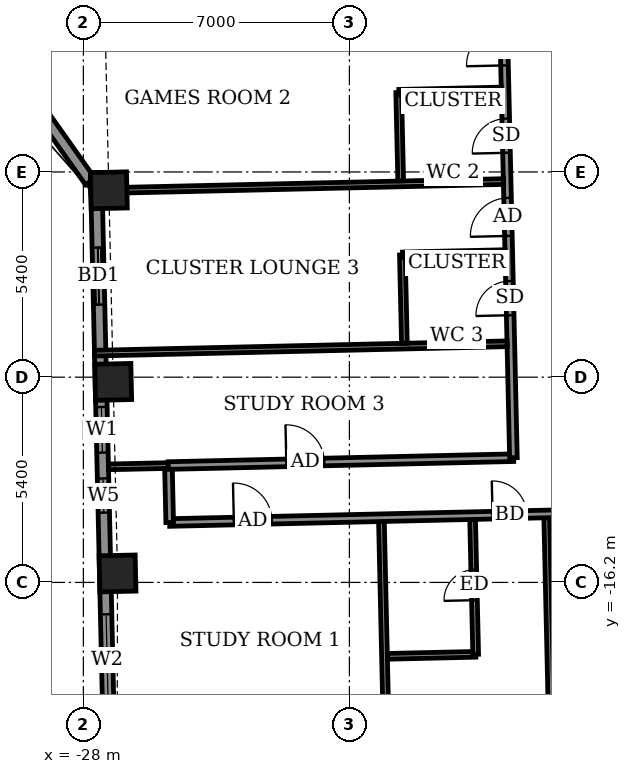
"""IFC4 building model, lengths in metres.
Left out: names, types, materials, properties, quantities, classifications, styles, units other than length and angle.
Written with IfcOpenShell. Run it as: python <this file> out.ifc"""

import sys

from ifc_helpers import new_model, si_unit, direction, frame, frame_2d, origin, origin_2d, place, context, subcontext, project, spatial, rectangle, extrude, element, fill, save


model = new_model("IFC4")
c1 = context("Model", 3, precision=1e-05, world=origin(), true_north=direction((0.0, 1.0)))
c2 = subcontext(c1, "Body", "Model", "MODEL_VIEW")
j1 = project(units=[si_unit("LENGTHUNIT", "METRE"), si_unit("PLANEANGLEUNIT", "RADIAN")], contexts=[c1])
p1 = place(None, origin())
s1 = spatial("IfcSite", under=j1, at=p1, CompositionType="ELEMENT")
p2 = place(p1, origin())
s2 = spatial("IfcBuilding", under=s1, at=p2, CompositionType="ELEMENT")
p3 = place(p2, frame((0.0, 0.0, 297.9)))
s3 = spatial("IfcBuildingStorey", under=s2, at=p3, CompositionType="ELEMENT", Elevation=297.9)
for number, where, z_axis, x_axis in (
    (1, (-27.329, -5.883, -0.55), (0.0, 0.0, 1.0), (0.023, -1.0, 0.0)),
    (2, (-27.215, -10.924, -0.55), (0.0, 0.0, 1.0), (0.023, -1.0, 0.0)),
    (3, (-27.101, -15.964, -0.55), (0.0, 0.0, 1.0), (0.023, -1.0, 0.0)),
):
    element("IfcColumn", number, at=place(p3, frame(where, z_axis=z_axis, x_axis=x_axis)), inside=s3, PredefinedType="COLUMN", context=c2, shape_type="SweptSolid", body=[
        extrude(rectangle(XDim=0.95, YDim=0.95, at=origin_2d()), origin(), (0.0, 0.0, 1.0), 3.6),
    ])
p4 = place(p3, frame((-29.883, -2.738, 0.0), z_axis=(0.0, 0.0, 1.0), x_axis=(0.578095163598, -0.815969351033, 0.0)))
e4 = element("IfcWall", 4, at=p4, inside=s3, PredefinedType="SOLIDWALL", context=c2, shape_type="SweptSolid", body=[
    extrude(rectangle(XDim=3.569, YDim=0.3, at=frame_2d((1.784, 0.0))), origin(), (0.0, 0.0, 1.0), 3.05),
])
p5 = place(p4, frame((0.338, 0.0, 0.9)))
e5 = element("IfcOpeningElement", 5, at=p5, cuts=e4, PredefinedType="OPENING", context=c2, shape_type="SweptSolid", body=[
    extrude(rectangle(XDim=1.2, YDim=1.5, at=frame_2d((0.6, 0.75))), frame((0.0, 0.16, 0.0), z_axis=(0.0, -1.0, 0.0), x_axis=(1.0, 0.0, 0.0)), (0.0, 0.0, 1.0), 0.32),
])
p6 = place(p3, frame((-27.665, -5.416, 0.0), z_axis=(0.0, 0.0, 1.0), x_axis=(0.022660024814, -0.999743228672, 0.0)))
e6 = element("IfcWall", 6, at=p6, inside=s3, PredefinedType="SOLIDWALL", context=c2, shape_type="SweptSolid", body=[
    extrude(rectangle(XDim=15.45, YDim=0.3, at=frame_2d((7.725, 0.0))), origin(), (0.0, 0.0, 1.0), 2.55),
])
p7 = place(p6, frame((1.975, 0.0, 0.0)))
e7 = element("IfcOpeningElement", 7, at=p7, cuts=e6, PredefinedType="OPENING", context=c2, shape_type="SweptSolid", body=[
    extrude(rectangle(XDim=1.5, YDim=2.4, at=frame_2d((0.75, 1.2))), frame((0.0, 0.16, 0.0), z_axis=(0.0, -1.0, 0.0), x_axis=(1.0, 0.0, 0.0)), (0.0, 0.0, 1.0), 0.32),
])
p8 = place(p6, frame((6.171, 0.0, 0.9)))
e8 = element("IfcOpeningElement", 8, at=p8, cuts=e6, PredefinedType="OPENING", context=c2, shape_type="SweptSolid", body=[
    extrude(rectangle(XDim=1.2, YDim=1.5, at=frame_2d((0.6, 0.75))), frame((0.0, 0.16, 0.0), z_axis=(0.0, -1.0, 0.0), x_axis=(1.0, 0.0, 0.0)), (0.0, 0.0, 1.0), 0.32),
])
p9 = place(p6, frame((8.05, 0.0, 0.9)))
e9 = element("IfcOpeningElement", 9, at=p9, cuts=e6, PredefinedType="OPENING", context=c2, shape_type="SweptSolid", body=[
    extrude(rectangle(XDim=0.9, YDim=1.5, at=frame_2d((0.45, 0.75))), frame((0.0, 0.16, 0.0), z_axis=(0.0, -1.0, 0.0), x_axis=(1.0, 0.0, 0.0)), (0.0, 0.0, 1.0), 0.32),
])
p10 = place(p6, frame((11.625, 0.0, 0.9)))
e10 = element("IfcOpeningElement", 10, at=p10, cuts=e6, PredefinedType="OPENING", context=c2, shape_type="SweptSolid", body=[
    extrude(rectangle(XDim=2.4, YDim=1.5, at=frame_2d((1.2, 0.75))), frame((0.0, 0.16, 0.0), z_axis=(0.0, -1.0, 0.0), x_axis=(1.0, 0.0, 0.0)), (0.0, 0.0, 1.0), 0.32),
])
p11 = place(p3, frame((-19.922, -24.945, 0.0), z_axis=(0.0, 0.0, 1.0), x_axis=(-0.022692470342, 0.99974249274, 0.0)))
e11 = element("IfcWall", 11, at=p11, inside=s3, PredefinedType="PARTITIONING", context=c2, shape_type="SweptSolid", body=[
    extrude(rectangle(XDim=10.35, YDim=0.15, at=frame_2d((5.175, 0.0))), origin(), (0.0, 0.0, 1.0), 2.55),
])
p12 = place(p3, frame((-15.573, -24.847, 0.0), z_axis=(0.0, 0.0, 1.0), x_axis=(-0.022714440015, 0.999741993824, 0.0)))
e12 = element("IfcWall", 12, at=p12, inside=s3, PredefinedType="PARTITIONING", context=c2, shape_type="SweptSolid", body=[
    extrude(rectangle(XDim=10.351, YDim=0.15, at=frame_2d((5.175, 0.0))), origin(), (0.0, 0.0, 1.0), 3.05),
])
p13 = place(p3, frame((-19.999, -18.145, 0.0), z_axis=(0.0, 0.0, 1.0), x_axis=(0.999740260747, 0.02279059109, 0.0)))
e13 = element("IfcWall", 13, at=p13, inside=s3, PredefinedType="PARTITIONING", context=c2, shape_type="SweptSolid", body=[
    extrude(rectangle(XDim=2.324, YDim=0.15, at=frame_2d((1.162, 0.0))), origin(), (0.0, 0.0, 1.0), 3.05),
])
p14 = place(p3, frame((-17.677, -18.092, 0.0), z_axis=(0.0, 0.0, 1.0), x_axis=(-0.022832321005, 0.999739308579, 0.0)))
e14 = element("IfcWall", 14, at=p14, inside=s3, PredefinedType="PARTITIONING", context=c2, shape_type="SweptSolid", body=[
    extrude(rectangle(XDim=3.55, YDim=0.15, at=frame_2d((1.775, 0.0))), origin(), (0.0, 0.0, 1.0), 3.05),
])
p15 = place(p14, frame((1.425, 0.0, 0.0)))
e15 = element("IfcOpeningElement", 15, at=p15, cuts=e14, PredefinedType="OPENING", context=c2, shape_type="SweptSolid", body=[
    extrude(rectangle(XDim=0.8, YDim=2.1, at=frame_2d((0.4, 1.05))), frame((0.0, 0.085, 0.0), z_axis=(0.0, -1.0, 0.0), x_axis=(1.0, 0.0, 0.0)), (0.0, 0.0, 1.0), 0.17),
])
p16 = place(p3, frame((-25.731, -14.624, 0.0), z_axis=(0.0, 0.0, 1.0), x_axis=(0.999742799525, 0.022678950563, 0.0)))
e16 = element("IfcWall", 16, at=p16, inside=s3, PredefinedType="PARTITIONING", context=c2, shape_type="SweptSolid", body=[
    extrude(rectangle(XDim=55.386, YDim=0.2, at=frame_2d((27.693, 0.0))), origin(), (0.0, 0.0, 1.0), 3.05),
])
p17 = place(p16, frame((1.691, 0.0, 0.0)))
e17 = element("IfcOpeningElement", 17, at=p17, cuts=e16, PredefinedType="OPENING", context=c2, shape_type="SweptSolid", body=[
    extrude(rectangle(XDim=1.0, YDim=2.1, at=frame_2d((0.5, 1.05))), frame((0.0, 0.11, 0.0), z_axis=(0.0, -1.0, 0.0), x_axis=(1.0, 0.0, 0.0)), (0.0, 0.0, 1.0), 0.22),
])
p18 = place(p16, frame((8.5, 0.0, 0.0)))
e18 = element("IfcOpeningElement", 18, at=p18, cuts=e16, PredefinedType="OPENING", context=c2, shape_type="SweptSolid", body=[
    extrude(rectangle(XDim=0.9, YDim=2.1, at=frame_2d((0.45, 1.05))), frame((0.0, 0.11, 0.0), z_axis=(0.0, -1.0, 0.0), x_axis=(1.0, 0.0, 0.0)), (0.0, 0.0, 1.0), 0.22),
])
p19 = place(p16, frame((10.5, 0.0, 0.0)))
e19 = element("IfcOpeningElement", 19, at=p19, cuts=e16, PredefinedType="OPENING", context=c2, shape_type="SweptSolid", body=[
    extrude(rectangle(XDim=0.9, YDim=2.1, at=frame_2d((0.45, 1.05))), frame((0.0, 0.11, 0.0), z_axis=(0.0, -1.0, 0.0), x_axis=(1.0, 0.0, 0.0)), (0.0, 0.0, 1.0), 0.22),
])
p20 = place(p16, frame((17.325, 0.0, 0.0)))
e20 = element("IfcOpeningElement", 20, at=p20, cuts=e16, PredefinedType="OPENING", context=c2, shape_type="SweptSolid", body=[
    extrude(rectangle(XDim=0.9, YDim=2.1, at=frame_2d((0.45, 1.05))), frame((0.0, 0.11, 0.0), z_axis=(0.0, -1.0, 0.0), x_axis=(1.0, 0.0, 0.0)), (0.0, 0.0, 1.0), 0.22),
])
p21 = place(p16, frame((19.375, 0.0, 0.0)))
e21 = element("IfcOpeningElement", 21, at=p21, cuts=e16, PredefinedType="OPENING", context=c2, shape_type="SweptSolid", body=[
    extrude(rectangle(XDim=0.9, YDim=2.1, at=frame_2d((0.45, 1.05))), frame((0.0, 0.11, 0.0), z_axis=(0.0, -1.0, 0.0), x_axis=(1.0, 0.0, 0.0)), (0.0, 0.0, 1.0), 0.22),
])
p22 = place(p16, frame((26.275, 0.0, 0.0)))
e22 = element("IfcOpeningElement", 22, at=p22, cuts=e16, PredefinedType="OPENING", context=c2, shape_type="SweptSolid", body=[
    extrude(rectangle(XDim=0.9, YDim=2.1, at=frame_2d((0.45, 1.05))), frame((0.0, 0.11, 0.0), z_axis=(0.0, -1.0, 0.0), x_axis=(1.0, 0.0, 0.0)), (0.0, 0.0, 1.0), 0.22),
])
p23 = place(p16, frame((28.425, 0.0, 0.0)))
e23 = element("IfcOpeningElement", 23, at=p23, cuts=e16, PredefinedType="OPENING", context=c2, shape_type="SweptSolid", body=[
    extrude(rectangle(XDim=0.9, YDim=2.1, at=frame_2d((0.45, 1.05))), frame((0.0, 0.11, 0.0), z_axis=(0.0, -1.0, 0.0), x_axis=(1.0, 0.0, 0.0)), (0.0, 0.0, 1.0), 0.22),
])
p24 = place(p16, frame((35.425, 0.0, 0.0)))
e24 = element("IfcOpeningElement", 24, at=p24, cuts=e16, PredefinedType="OPENING", context=c2, shape_type="SweptSolid", body=[
    extrude(rectangle(XDim=0.9, YDim=2.1, at=frame_2d((0.45, 1.05))), frame((0.0, 0.11, 0.0), z_axis=(0.0, -1.0, 0.0), x_axis=(1.0, 0.0, 0.0)), (0.0, 0.0, 1.0), 0.22),
])
p25 = place(p16, frame((37.625, 0.0, 0.0)))
e25 = element("IfcOpeningElement", 25, at=p25, cuts=e16, PredefinedType="OPENING", context=c2, shape_type="SweptSolid", body=[
    extrude(rectangle(XDim=0.9, YDim=2.1, at=frame_2d((0.45, 1.05))), frame((0.0, 0.11, 0.0), z_axis=(0.0, -1.0, 0.0), x_axis=(1.0, 0.0, 0.0)), (0.0, 0.0, 1.0), 0.22),
])
p26 = place(p16, frame((44.475, 0.0, 0.0)))
e26 = element("IfcOpeningElement", 26, at=p26, cuts=e16, PredefinedType="OPENING", context=c2, shape_type="SweptSolid", body=[
    extrude(rectangle(XDim=0.9, YDim=2.1, at=frame_2d((0.45, 1.05))), frame((0.0, 0.11, 0.0), z_axis=(0.0, -1.0, 0.0), x_axis=(1.0, 0.0, 0.0)), (0.0, 0.0, 1.0), 0.22),
])
p27 = place(p16, frame((52.268, 0.0, 0.0)))
e27 = element("IfcOpeningElement", 27, at=p27, cuts=e16, PredefinedType="OPENING", context=c2, shape_type="SweptSolid", body=[
    extrude(rectangle(XDim=1.0, YDim=2.1, at=frame_2d((0.5, 1.05))), frame((0.0, 0.11, 0.0), z_axis=(0.0, -1.0, 0.0), x_axis=(1.0, 0.0, 0.0)), (0.0, 0.0, 1.0), 0.22),
])
p28 = place(p16, frame((46.625, 0.0, 0.0)))
e28 = element("IfcOpeningElement", 28, at=p28, cuts=e16, PredefinedType="OPENING", context=c2, shape_type="SweptSolid", body=[
    extrude(rectangle(XDim=0.9, YDim=2.1, at=frame_2d((0.45, 1.05))), frame((0.0, 0.11, 0.0), z_axis=(0.0, -1.0, 0.0), x_axis=(1.0, 0.0, 0.0)), (0.0, 0.0, 1.0), 0.22),
])
p29 = place(p3, frame((-25.728, -14.624, 0.0), z_axis=(0.0, 0.0, 1.0), x_axis=(-0.022632637625, 0.99974384905, 0.0)))
e29 = element("IfcWall", 29, at=p29, inside=s3, PredefinedType="PARTITIONING", context=c2, shape_type="SweptSolid", body=[
    extrude(rectangle(XDim=1.5, YDim=0.2, at=frame_2d((0.75, 0.0))), origin(), (0.0, 0.0, 1.0), 3.05),
])
p30 = place(p3, frame((-27.339, -13.16, 0.0), z_axis=(0.0, 0.0, 1.0), x_axis=(0.999755386732, 0.022117113289, 0.0)))
e30 = element("IfcWall", 30, at=p30, inside=s3, PredefinedType="PARTITIONING", context=c2, shape_type="SweptSolid", body=[
    extrude(rectangle(XDim=1.579, YDim=0.15, at=frame_2d((0.789, 0.0))), origin(), (0.0, 0.0, 1.0), 2.55),
])
p31 = place(p3, frame((-25.765, -13.125, 0.0), z_axis=(0.0, 0.0, 1.0), x_axis=(0.999740502457, 0.022779985654, 0.0)))
e31 = element("IfcWall", 31, at=p31, inside=s3, PredefinedType="PARTITIONING", context=c2, shape_type="SweptSolid", body=[
    extrude(rectangle(XDim=9.088, YDim=0.2, at=frame_2d((4.544, 0.0))), origin(), (0.0, 0.0, 1.0), 3.05),
])
p32 = place(p31, frame((3.107, 0.0, 0.0)))
e32 = element("IfcOpeningElement", 32, at=p32, cuts=e31, PredefinedType="OPENING", context=c2, shape_type="SweptSolid", body=[
    extrude(rectangle(XDim=1.0, YDim=2.1, at=frame_2d((0.5, 1.05))), frame((0.0, 0.11, 0.0), z_axis=(0.0, -1.0, 0.0), x_axis=(1.0, 0.0, 0.0)), (0.0, 0.0, 1.0), 0.22),
])
p33 = place(p3, frame((-16.684, -12.919, 0.0), z_axis=(0.0, 0.0, 1.0), x_axis=(-0.022712214871, 0.999742044377, 0.0)))
e33 = element("IfcWall", 33, at=p33, inside=s3, PredefinedType="PARTITIONING", context=c2, shape_type="SweptSolid", body=[
    extrude(rectangle(XDim=26.551, YDim=0.2, at=frame_2d((13.275, 0.0))), origin(), (0.0, 0.0, 1.0), 3.05),
])
p34 = place(p33, frame((24.588, 0.0, 0.0)))
e34 = element("IfcOpeningElement", 34, at=p34, cuts=e33, PredefinedType="OPENING", context=c2, shape_type="SweptSolid", body=[
    extrude(rectangle(XDim=1.0, YDim=2.1, at=frame_2d((0.5, 1.05))), frame((0.0, 0.11, 0.0), z_axis=(0.0, -1.0, 0.0), x_axis=(1.0, 0.0, 0.0)), (0.0, 0.0, 1.0), 0.22),
])
p35 = place(p33, frame((21.875, 0.0, 0.0)))
e35 = element("IfcOpeningElement", 35, at=p35, cuts=e33, PredefinedType="OPENING", context=c2, shape_type="SweptSolid", body=[
    extrude(rectangle(XDim=0.9, YDim=2.1, at=frame_2d((0.45, 1.05))), frame((0.0, 0.11, 0.0), z_axis=(0.0, -1.0, 0.0), x_axis=(1.0, 0.0, 0.0)), (0.0, 0.0, 1.0), 0.22),
])
p36 = place(p33, frame((17.05, 0.0, 0.0)))
e36 = element("IfcOpeningElement", 36, at=p36, cuts=e33, PredefinedType="OPENING", context=c2, shape_type="SweptSolid", body=[
    extrude(rectangle(XDim=1.0, YDim=2.1, at=frame_2d((0.5, 1.05))), frame((0.0, 0.11, 0.0), z_axis=(0.0, -1.0, 0.0), x_axis=(1.0, 0.0, 0.0)), (0.0, 0.0, 1.0), 0.22),
])
p37 = place(p33, frame((19.375, 0.0, 0.0)))
e37 = element("IfcOpeningElement", 37, at=p37, cuts=e33, PredefinedType="OPENING", context=c2, shape_type="SweptSolid", body=[
    extrude(rectangle(XDim=0.9, YDim=2.1, at=frame_2d((0.45, 1.05))), frame((0.0, 0.11, 0.0), z_axis=(0.0, -1.0, 0.0), x_axis=(1.0, 0.0, 0.0)), (0.0, 0.0, 1.0), 0.22),
])
p38 = place(p33, frame((14.925, 0.0, 0.0)))
e38 = element("IfcOpeningElement", 38, at=p38, cuts=e33, PredefinedType="OPENING", context=c2, shape_type="SweptSolid", body=[
    extrude(rectangle(XDim=1.0, YDim=2.1, at=frame_2d((0.5, 1.05))), frame((0.0, 0.11, 0.0), z_axis=(0.0, -1.0, 0.0), x_axis=(1.0, 0.0, 0.0)), (0.0, 0.0, 1.0), 0.22),
])
p39 = place(p33, frame((12.725, 0.0, 0.0)))
e39 = element("IfcOpeningElement", 39, at=p39, cuts=e33, PredefinedType="OPENING", context=c2, shape_type="SweptSolid", body=[
    extrude(rectangle(XDim=0.9, YDim=2.1, at=frame_2d((0.45, 1.05))), frame((0.0, 0.11, 0.0), z_axis=(0.0, -1.0, 0.0), x_axis=(1.0, 0.0, 0.0)), (0.0, 0.0, 1.0), 0.22),
])
p40 = place(p33, frame((10.325, 0.0, 0.0)))
e40 = element("IfcOpeningElement", 40, at=p40, cuts=e33, PredefinedType="OPENING", context=c2, shape_type="SweptSolid", body=[
    extrude(rectangle(XDim=1.0, YDim=2.1, at=frame_2d((0.5, 1.05))), frame((0.0, 0.11, 0.0), z_axis=(0.0, -1.0, 0.0), x_axis=(1.0, 0.0, 0.0)), (0.0, 0.0, 1.0), 0.22),
])
p41 = place(p33, frame((8.025, 0.0, 0.0)))
e41 = element("IfcOpeningElement", 41, at=p41, cuts=e33, PredefinedType="OPENING", context=c2, shape_type="SweptSolid", body=[
    extrude(rectangle(XDim=0.9, YDim=2.1, at=frame_2d((0.45, 1.05))), frame((0.0, 0.11, 0.0), z_axis=(0.0, -1.0, 0.0), x_axis=(1.0, 0.0, 0.0)), (0.0, 0.0, 1.0), 0.22),
])
p42 = place(p33, frame((5.837, 0.0, 0.0)))
e42 = element("IfcOpeningElement", 42, at=p42, cuts=e33, PredefinedType="OPENING", context=c2, shape_type="SweptSolid", body=[
    extrude(rectangle(XDim=1.0, YDim=2.1, at=frame_2d((0.5, 1.05))), frame((0.0, 0.11, 0.0), z_axis=(0.0, -1.0, 0.0), x_axis=(1.0, 0.0, 0.0)), (0.0, 0.0, 1.0), 0.22),
])
p43 = place(p33, frame((3.75, 0.0, 0.0)))
e43 = element("IfcOpeningElement", 43, at=p43, cuts=e33, PredefinedType="OPENING", context=c2, shape_type="SweptSolid", body=[
    extrude(rectangle(XDim=0.9, YDim=2.1, at=frame_2d((0.45, 1.05))), frame((0.0, 0.11, 0.0), z_axis=(0.0, -1.0, 0.0), x_axis=(1.0, 0.0, 0.0)), (0.0, 0.0, 1.0), 0.22),
])
p44 = place(p3, frame((-27.707, -10.168, 0.0), z_axis=(0.0, 0.0, 1.0), x_axis=(0.999741313154, 0.022744378952, 0.0)))
e44 = element("IfcWall", 44, at=p44, inside=s3, PredefinedType="PARTITIONING", context=c2, shape_type="SweptSolid", body=[
    extrude(rectangle(XDim=10.863, YDim=0.15, at=frame_2d((5.432, 0.0))), origin(), (0.0, 0.0, 1.0), 2.55),
])
p45 = place(p3, frame((-19.553, -9.908, 0.0), z_axis=(0.0, 0.0, 1.0), x_axis=(-0.022781023197, 0.999740478815, 0.0)))
e45 = element("IfcWall", 45, at=p45, inside=s3, PredefinedType="PARTITIONING", context=c2, shape_type="SweptSolid", body=[
    extrude(rectangle(XDim=2.325, YDim=0.15, at=frame_2d((1.163, 0.0))), origin(), (0.0, 0.0, 1.0), 3.05),
])
p46 = place(p3, frame((-19.601, -7.583, 0.0), z_axis=(0.0, 0.0, 1.0), x_axis=(0.999744396973, 0.02260842146, 0.0)))
e46 = element("IfcWall", 46, at=p46, inside=s3, PredefinedType="PARTITIONING", context=c2, shape_type="SweptSolid", body=[
    extrude(rectangle(XDim=2.7, YDim=0.15, at=frame_2d((1.35, 0.0))), origin(), (0.0, 0.0, 1.0), 3.05),
])
p47 = place(p3, frame((-27.804, -5.899, 0.0), z_axis=(0.0, 0.0, 1.0), x_axis=(0.999743850541, 0.02263257177, 0.0)))
e47 = element("IfcWall", 47, at=p47, inside=s3, PredefinedType="PARTITIONING", context=c2, shape_type="SweptSolid", body=[
    extrude(rectangle(XDim=10.863, YDim=0.15, at=frame_2d((5.431, 0.0))), origin(), (0.0, 0.0, 1.0), 3.05),
])
p48 = place(p3, frame((-19.65, -5.634, 0.0), z_axis=(0.0, 0.0, 1.0), x_axis=(-0.02279059109, 0.999740260747, 0.0)))
e48 = element("IfcWall", 48, at=p48, inside=s3, PredefinedType="PARTITIONING", context=c2, shape_type="SweptSolid", body=[
    extrude(rectangle(XDim=2.324, YDim=0.15, at=frame_2d((1.162, 0.0))), origin(), (0.0, 0.0, 1.0), 3.05),
])
p49 = place(p3, frame((-19.698, -3.304, 0.0), z_axis=(0.0, 0.0, 1.0), x_axis=(0.999744396973, 0.02260842146, 0.0)))
e49 = element("IfcWall", 49, at=p49, inside=s3, PredefinedType="PARTITIONING", context=c2, shape_type="SweptSolid", body=[
    extrude(rectangle(XDim=2.7, YDim=0.15, at=frame_2d((1.35, 0.0))), origin(), (0.0, 0.0, 1.0), 3.05),
])
p50 = place(p7, origin())
e50 = element("IfcDoor", 50, at=p50, inside=s3, OperationType="SLIDING_TO_LEFT", PredefinedType="DOOR", context=c2, shape_type="SweptSolid", body=[
    extrude(rectangle(XDim=1.5, YDim=2.4, at=frame_2d((0.75, 1.2))), frame((0.0, 0.025, 0.0), z_axis=(0.0, -1.0, 0.0), x_axis=(1.0, 0.0, 0.0)), (0.0, 0.0, 1.0), 0.05),
])
fill(e7, e50)
p51 = place(p8, origin())
e51 = element("IfcWindow", 51, at=p51, inside=s3, PartitioningType="SINGLE_PANEL", PredefinedType="WINDOW", context=c2, shape_type="SweptSolid", body=[
    extrude(rectangle(XDim=1.2, YDim=1.5, at=frame_2d((0.6, 0.75))), frame((0.0, 0.03, 0.0), z_axis=(0.0, -1.0, 0.0), x_axis=(1.0, 0.0, 0.0)), (0.0, 0.0, 1.0), 0.06),
])
fill(e8, e51)
p52 = place(p9, origin())
e52 = element("IfcWindow", 52, at=p52, inside=s3, PartitioningType="SINGLE_PANEL", PredefinedType="WINDOW", context=c2, shape_type="SweptSolid", body=[
    extrude(rectangle(XDim=0.9, YDim=1.5, at=frame_2d((0.45, 0.75))), frame((0.0, 0.03, 0.0), z_axis=(0.0, -1.0, 0.0), x_axis=(1.0, 0.0, 0.0)), (0.0, 0.0, 1.0), 0.06),
])
fill(e9, e52)
p53 = place(p10, origin())
e53 = element("IfcWindow", 53, at=p53, inside=s3, PartitioningType="DOUBLE_PANEL_VERTICAL", PredefinedType="WINDOW", context=c2, shape_type="SweptSolid", body=[
    extrude(rectangle(XDim=2.4, YDim=1.5, at=frame_2d((1.2, 0.75))), frame((0.0, 0.03, 0.0), z_axis=(0.0, -1.0, 0.0), x_axis=(1.0, 0.0, 0.0)), (0.0, 0.0, 1.0), 0.06),
])
fill(e10, e53)
p54 = place(p17, origin())
e54 = element("IfcDoor", 54, at=p54, inside=s3, OperationType="SINGLE_SWING_LEFT", PredefinedType="DOOR", context=c2, shape_type="SweptSolid", body=[
    extrude(rectangle(XDim=1.0, YDim=2.1, at=frame_2d((0.5, 1.05))), frame((0.0, 0.025, 0.0), z_axis=(0.0, -1.0, 0.0), x_axis=(1.0, 0.0, 0.0)), (0.0, 0.0, 1.0), 0.05),
])
fill(e17, e54)
p55 = place(p18, origin())
e55 = element("IfcDoor", 55, at=p55, inside=s3, OperationType="SINGLE_SWING_LEFT", PredefinedType="DOOR", context=c2, shape_type="SweptSolid", body=[
    extrude(rectangle(XDim=0.9, YDim=2.1, at=frame_2d((0.45, 1.05))), frame((0.0, 0.025, 0.0), z_axis=(0.0, -1.0, 0.0), x_axis=(1.0, 0.0, 0.0)), (0.0, 0.0, 1.0), 0.05),
])
fill(e18, e55)
p56 = place(p15, origin())
e56 = element("IfcDoor", 56, at=p56, inside=s3, OperationType="SINGLE_SWING_LEFT", PredefinedType="DOOR", context=c2, shape_type="SweptSolid", body=[
    extrude(rectangle(XDim=0.8, YDim=2.1, at=frame_2d((0.4, 1.05))), frame((0.0, 0.025, 0.0), z_axis=(0.0, -1.0, 0.0), x_axis=(1.0, 0.0, 0.0)), (0.0, 0.0, 1.0), 0.05),
])
fill(e15, e56)
p57 = place(p40, origin())
e57 = element("IfcDoor", 57, at=p57, inside=s3, OperationType="SINGLE_SWING_RIGHT", PredefinedType="DOOR", context=c2, shape_type="SweptSolid", body=[
    extrude(rectangle(XDim=1.0, YDim=2.1, at=frame_2d((0.5, 1.05))), frame((0.0, 0.025, 0.0), z_axis=(0.0, -1.0, 0.0), x_axis=(1.0, 0.0, 0.0)), (0.0, 0.0, 1.0), 0.05),
])
fill(e40, e57)
p58 = place(p41, origin())
e58 = element("IfcDoor", 58, at=p58, inside=s3, OperationType="SINGLE_SWING_RIGHT", PredefinedType="DOOR", context=c2, shape_type="SweptSolid", body=[
    extrude(rectangle(XDim=0.9, YDim=2.1, at=frame_2d((0.45, 1.05))), frame((0.0, 0.025, 0.0), z_axis=(0.0, -1.0, 0.0), x_axis=(1.0, 0.0, 0.0)), (0.0, 0.0, 1.0), 0.05),
])
fill(e41, e58)
p59 = place(p42, origin())
e59 = element("IfcDoor", 59, at=p59, inside=s3, OperationType="SINGLE_SWING_LEFT", PredefinedType="DOOR", context=c2, shape_type="SweptSolid", body=[
    extrude(rectangle(XDim=1.0, YDim=2.1, at=frame_2d((0.5, 1.05))), frame((0.0, 0.025, 0.0), z_axis=(0.0, -1.0, 0.0), x_axis=(1.0, 0.0, 0.0)), (0.0, 0.0, 1.0), 0.05),
])
fill(e42, e59)
p60 = place(p43, origin())
e60 = element("IfcDoor", 60, at=p60, inside=s3, OperationType="SINGLE_SWING_LEFT", PredefinedType="DOOR", context=c2, shape_type="SweptSolid", body=[
    extrude(rectangle(XDim=0.9, YDim=2.1, at=frame_2d((0.45, 1.05))), frame((0.0, 0.025, 0.0), z_axis=(0.0, -1.0, 0.0), x_axis=(1.0, 0.0, 0.0)), (0.0, 0.0, 1.0), 0.05),
])
fill(e43, e60)
p61 = place(p32, origin())
e61 = element("IfcDoor", 61, at=p61, inside=s3, OperationType="SINGLE_SWING_RIGHT", PredefinedType="DOOR", context=c2, shape_type="SweptSolid", body=[
    extrude(rectangle(XDim=1.0, YDim=2.1, at=frame_2d((0.5, 1.05))), frame((0.0, 0.025, 0.0), z_axis=(0.0, -1.0, 0.0), x_axis=(1.0, 0.0, 0.0)), (0.0, 0.0, 1.0), 0.05),
])
fill(e32, e61)
save(model, sys.argv[1])
